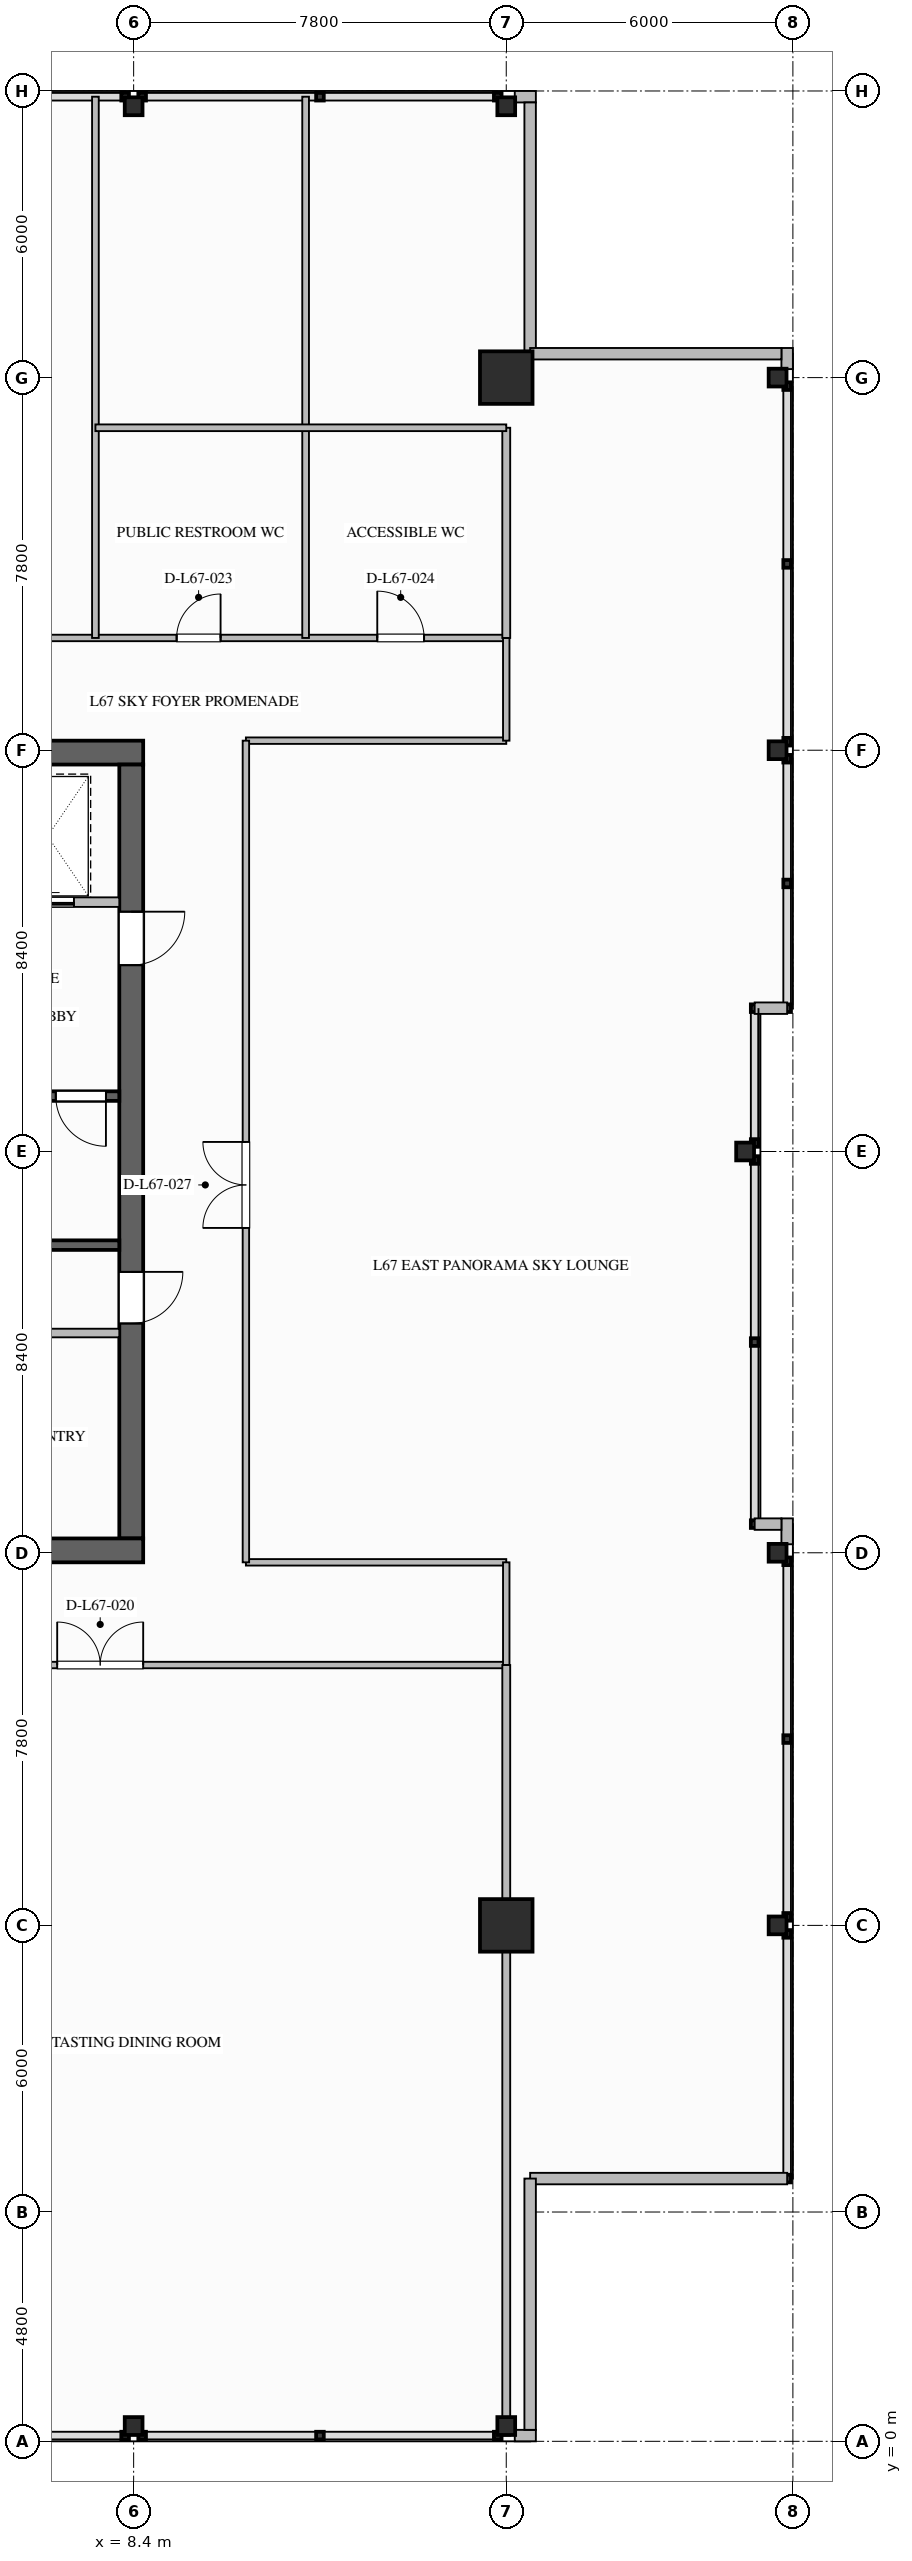
"""IFC4 building model, lengths in metres.
Left out: names, types, materials, properties, quantities, classifications, styles, units other than length and angle.
Written with IfcOpenShell. Run it as: python <this file> out.ifc"""

import sys

from ifc_helpers import new_model, si_unit, direction, frame, frame_2d, origin, origin_2d, place, context, subcontext, project, spatial, rectangle, i_section, extrude, element, fill, save


model = new_model("IFC4")
c1 = context("Model", 3, precision=1e-05, world=origin(), true_north=direction((0.0, 1.0)))
c2 = subcontext(c1, "Body", "Model", "MODEL_VIEW")
j1 = project(units=[si_unit("LENGTHUNIT", "METRE"), si_unit("PLANEANGLEUNIT", "RADIAN")], contexts=[c1])
p1 = place(None, origin())
s1 = spatial("IfcSite", under=j1, at=p1, CompositionType="ELEMENT")
p2 = place(p1, origin())
s2 = spatial("IfcBuilding", under=s1, at=p2, CompositionType="ELEMENT")
p3 = place(p2, frame((0.0, 0.0, 255.5)))
s3 = spatial("IfcBuildingStorey", under=s2, at=p3, CompositionType="ELEMENT", Elevation=255.5)
p4 = place(p3, frame((-8.6, 35.35, 0.0), z_axis=(0.0, 0.0, 1.0), x_axis=(1.0, 0.0, 0.0)))
e1 = element("IfcWall", 1, at=p4, inside=s3, PredefinedType="SHEAR", context=c2, shape_type="SweptSolid", body=[
    extrude(rectangle(XDim=17.2, YDim=0.5, at=frame_2d((8.6, 0.0))), origin(), (0.0, 0.0, 1.0), 4.5),
])
p5 = place(p3, frame((8.35, 35.1, 0.0), z_axis=(0.0, 0.0, 1.0), x_axis=(0.0, -1.0, 0.0)))
e2 = element("IfcWall", 2, at=p5, inside=s3, PredefinedType="SHEAR", context=c2, shape_type="SweptSolid", body=[
    extrude(rectangle(XDim=16.2, YDim=0.5, at=frame_2d((8.1, 0.0))), origin(), (0.0, 0.0, 1.0), 4.5),
])
p6 = place(p5, frame((3.08, 0.0, 0.0)))
e3 = element("IfcOpeningElement", 3, at=p6, cuts=e2, PredefinedType="OPENING", context=c2, shape_type="SweptSolid", body=[
    extrude(rectangle(XDim=1.12, YDim=2.1, at=frame_2d((0.56, 1.05))), frame((0.0, 0.26, 0.0), z_axis=(0.0, -1.0, 0.0), x_axis=(1.0, 0.0, 0.0)), (0.0, 0.0, 1.0), 0.52),
])
p7 = place(p5, frame((10.62, 0.0, 0.0)))
e4 = element("IfcOpeningElement", 4, at=p7, cuts=e2, PredefinedType="OPENING", context=c2, shape_type="SweptSolid", body=[
    extrude(rectangle(XDim=1.08, YDim=2.04, at=frame_2d((0.54, 1.02))), frame((0.0, 0.26, 0.0), z_axis=(0.0, -1.0, 0.0), x_axis=(1.0, 0.0, 0.0)), (0.0, 0.0, 1.0), 0.52),
])
p8 = place(p3, frame((8.6, 18.65, 0.0), z_axis=(0.0, 0.0, 1.0), x_axis=(-1.0, 0.0, 0.0)))
e5 = element("IfcWall", 5, at=p8, inside=s3, PredefinedType="SHEAR", context=c2, shape_type="SweptSolid", body=[
    extrude(rectangle(XDim=17.2, YDim=0.5, at=frame_2d((8.6, 0.0))), origin(), (0.0, 0.0, 1.0), 4.5),
])
for number, where, z_axis, x_axis in (
    (6, (16.2, 10.8, 0.0), (0.0, 0.0, 1.0), (1.0, 0.0, 0.0)),
    (7, (16.2, 43.2, 0.0), (0.0, 0.0, 1.0), (1.0, 0.0, 0.0)),
):
    element("IfcColumn", number, at=place(p3, frame(where, z_axis=z_axis, x_axis=x_axis)), inside=s3, PredefinedType="COLUMN", context=c2, shape_type="SweptSolid", body=[
        extrude(rectangle(XDim=1.1, YDim=1.1, at=origin_2d()), origin(), (0.0, 0.0, 1.0), 4.5),
    ])
for number, where, z_axis, x_axis in (
    (8, (21.88, 10.8, 0.0), (0.0, 0.0, 1.0), (1.0, 0.0, 0.0)),
    (9, (21.88, 18.6, 0.0), (0.0, 0.0, 1.0), (1.0, 0.0, 0.0)),
    (10, (21.2, 27.0, 0.0), (0.0, 0.0, 1.0), (1.0, 0.0, 0.0)),
    (11, (21.88, 35.4, 0.0), (0.0, 0.0, 1.0), (1.0, 0.0, 0.0)),
    (12, (21.88, 43.2, 0.0), (0.0, 0.0, 1.0), (1.0, 0.0, 0.0)),
    (13, (8.4, 0.32, 0.0), (0.0, 0.0, 1.0), (0.0, 1.0, 0.0)),
    (14, (8.4, 48.88, 0.0), (0.0, 0.0, 1.0), (0.0, 1.0, 0.0)),
    (15, (16.2, 0.32, 0.0), (0.0, 0.0, 1.0), (0.0, 1.0, 0.0)),
    (16, (16.2, 48.88, 0.0), (0.0, 0.0, 1.0), (0.0, 1.0, 0.0)),
):
    element("IfcColumn", number, at=place(p3, frame(where, z_axis=z_axis, x_axis=x_axis)), inside=s3, PredefinedType="COLUMN", context=c2, shape_type="SweptSolid", body=[
        extrude(i_section(OverallWidth=0.374, OverallDepth=0.372, WebThickness=0.016, FlangeThickness=0.026, FilletRadius=0.025, at=origin_2d()), origin(), (0.0, 0.0, 1.0), 4.497),
    ])
p9 = place(p3, frame((22.08, 43.82, 0.0), z_axis=(0.0, 0.0, 1.0), x_axis=(0.0, -1.0, 0.0)))
e17 = element("IfcWall", 17, at=p9, inside=s3, PredefinedType="STANDARD", context=c2, shape_type="SweptSolid", body=[
    extrude(rectangle(XDim=0.442, YDim=0.24, at=frame_2d((0.221, 0.0))), origin(), (0.0, 0.0, 1.0), 4.18),
])
p10 = place(p3, frame((22.08, 19.32, 0.0), z_axis=(0.0, 0.0, 1.0), x_axis=(0.0, -1.0, 0.0)))
e18 = element("IfcWall", 18, at=p10, inside=s3, PredefinedType="STANDARD", context=c2, shape_type="SweptSolid", body=[
    extrude(rectangle(XDim=0.542, YDim=0.24, at=frame_2d((0.271, 0.0))), origin(), (0.0, 0.0, 1.0), 4.18),
])
for number, where, z_axis, x_axis in (
    (19, (16.378, 49.08, 0.0), (0.0, 0.0, 1.0), (1.0, 0.0, 0.0)),
    (20, (16.82, 0.12, 0.0), (0.0, 0.0, 1.0), (-1.0, 0.0, 0.0)),
):
    element("IfcWall", number, at=place(p3, frame(where, z_axis=z_axis, x_axis=x_axis)), inside=s3, PredefinedType="STANDARD", context=c2, shape_type="SweptSolid", body=[
        extrude(rectangle(XDim=0.442, YDim=0.24, at=frame_2d((0.221, 0.0))), origin(), (0.0, 0.0, 1.0), 4.18),
    ])
for number, where, z_axis, x_axis in (
    (21, (16.7, 48.96, 0.0), (0.0, 0.0, 1.0), (0.0, -1.0, 0.0)),
    (22, (16.7, 43.7, 0.0), (0.0, 0.0, 1.0), (1.0, 0.0, 0.0)),
):
    element("IfcWall", number, at=place(p3, frame(where, z_axis=z_axis, x_axis=x_axis)), inside=s3, PredefinedType="STANDARD", context=c2, shape_type="SweptSolid", body=[
        extrude(rectangle(XDim=5.26, YDim=0.24, at=frame_2d((2.63, 0.0))), origin(), (0.0, 0.0, 1.0), 4.18),
    ])
p11 = place(p3, frame((22.08, 5.5, 0.0), z_axis=(0.0, 0.0, 1.0), x_axis=(-1.0, 0.0, 0.0)))
e23 = element("IfcWall", 23, at=p11, inside=s3, PredefinedType="STANDARD", context=c2, shape_type="SweptSolid", body=[
    extrude(rectangle(XDim=5.38, YDim=0.24, at=frame_2d((2.69, 0.0))), origin(), (0.0, 0.0, 1.0), 4.18),
])
p12 = place(p3, frame((16.7, 5.5, 0.0), z_axis=(0.0, 0.0, 1.0), x_axis=(0.0, -1.0, 0.0)))
e24 = element("IfcWall", 24, at=p12, inside=s3, PredefinedType="STANDARD", context=c2, shape_type="SweptSolid", body=[
    extrude(rectangle(XDim=5.26, YDim=0.24, at=frame_2d((2.63, 0.0))), origin(), (0.0, 0.0, 1.0), 4.18),
])
p13 = place(p3, frame((22.08, 30.0, 0.0), z_axis=(0.0, 0.0, 1.0), x_axis=(-1.0, 0.0, 0.0)))
e25 = element("IfcWall", 25, at=p13, inside=s3, PredefinedType="STANDARD", context=c2, shape_type="SweptSolid", body=[
    extrude(rectangle(XDim=0.68, YDim=0.24, at=frame_2d((0.34, 0.0))), origin(), (0.0, 0.0, 1.0), 4.18),
])
p14 = place(p3, frame((21.4, 19.2, 0.0), z_axis=(0.0, 0.0, 1.0), x_axis=(1.0, 0.0, 0.0)))
e26 = element("IfcWall", 26, at=p14, inside=s3, PredefinedType="STANDARD", context=c2, shape_type="SweptSolid", body=[
    extrude(rectangle(XDim=0.56, YDim=0.24, at=frame_2d((0.28, 0.0))), origin(), (0.0, 0.0, 1.0), 4.18),
])
p15 = place(p3, frame((0.0, 25.04, 0.0), z_axis=(0.0, 0.0, 1.0), x_axis=(1.0, 0.0, 0.0)))
e27 = element("IfcWall", 27, at=p15, inside=s3, PredefinedType="SOLIDWALL", context=c2, shape_type="SweptSolid", body=[
    extrude(rectangle(XDim=8.1, YDim=0.2, at=frame_2d((4.05, 0.0))), origin(), (0.0, 0.0, 1.0), 4.18),
])
p16 = place(p3, frame((8.1, 28.16, 0.0), z_axis=(0.0, 0.0, 1.0), x_axis=(-1.0, 0.0, 0.0)))
e28 = element("IfcWall", 28, at=p16, inside=s3, PredefinedType="SOLIDWALL", context=c2, shape_type="SweptSolid", body=[
    extrude(rectangle(XDim=8.1, YDim=0.2, at=frame_2d((4.05, 0.0))), origin(), (0.0, 0.0, 1.0), 4.18),
])
p17 = place(p16, frame((0.28, 0.0, 0.0)))
e29 = element("IfcOpeningElement", 29, at=p17, cuts=e28, PredefinedType="OPENING", context=c2, shape_type="SweptSolid", body=[
    extrude(rectangle(XDim=1.05, YDim=2.1, at=frame_2d((0.525, 1.05))), frame((0.0, 0.11, 0.0), z_axis=(0.0, -1.0, 0.0), x_axis=(1.0, 0.0, 0.0)), (0.0, 0.0, 1.0), 0.22),
])
p18 = place(p3, frame((3.1, 32.22, 0.0), z_axis=(0.0, 0.0, 1.0), x_axis=(1.0, 0.0, 0.0)))
e30 = element("IfcWall", 30, at=p18, inside=s3, PredefinedType="SOLIDWALL", context=c2, shape_type="SweptSolid", body=[
    extrude(rectangle(XDim=5.0, YDim=0.2, at=frame_2d((2.5, 0.0))), origin(), (0.0, 0.0, 1.0), 4.18),
])
p19 = place(p18, frame((0.55, 0.0, 0.0)))
e31 = element("IfcOpeningElement", 31, at=p19, cuts=e30, PredefinedType="OPENING", context=c2, shape_type="SweptSolid", body=[
    extrude(rectangle(XDim=1.2, YDim=2.2, at=frame_2d((0.6, 1.1))), frame((0.0, 0.11, 0.0), z_axis=(0.0, -1.0, 0.0), x_axis=(1.0, 0.0, 0.0)), (0.0, 0.0, 1.0), 0.22),
])
p20 = place(p18, frame((2.85, 0.0, 0.0)))
e32 = element("IfcOpeningElement", 32, at=p20, cuts=e30, PredefinedType="OPENING", context=c2, shape_type="SweptSolid", body=[
    extrude(rectangle(XDim=1.2, YDim=2.2, at=frame_2d((0.6, 1.1))), frame((0.0, 0.11, 0.0), z_axis=(0.0, -1.0, 0.0), x_axis=(1.0, 0.0, 0.0)), (0.0, 0.0, 1.0), 0.22),
])
p21 = place(p3, frame((-8.1, 23.2, 0.0), z_axis=(0.0, 0.0, 1.0), x_axis=(1.0, 0.0, 0.0)))
e33 = element("IfcWall", 33, at=p21, inside=s3, PredefinedType="SOLIDWALL", context=c2, shape_type="SweptSolid", body=[
    extrude(rectangle(XDim=16.2, YDim=0.18, at=frame_2d((8.1, 0.0))), origin(), (0.0, 0.0, 1.0), 4.18),
])
p22 = place(p21, frame((2.8, 0.0, 0.0)))
e34 = element("IfcOpeningElement", 34, at=p22, cuts=e33, PredefinedType="OPENING", context=c2, shape_type="SweptSolid", body=[
    extrude(rectangle(XDim=1.0, YDim=2.1, at=frame_2d((0.5, 1.05))), frame((0.0, 0.1, 0.0), z_axis=(0.0, -1.0, 0.0), x_axis=(1.0, 0.0, 0.0)), (0.0, 0.0, 1.0), 0.2),
])
p23 = place(p21, frame((11.5, 0.0, 0.0)))
e35 = element("IfcOpeningElement", 35, at=p23, cuts=e33, PredefinedType="OPENING", context=c2, shape_type="SweptSolid", body=[
    extrude(rectangle(XDim=1.0, YDim=2.1, at=frame_2d((0.5, 1.05))), frame((0.0, 0.1, 0.0), z_axis=(0.0, -1.0, 0.0), x_axis=(1.0, 0.0, 0.0)), (0.0, 0.0, 1.0), 0.2),
])
p24 = place(p3, frame((-16.2, 16.25, 0.0), z_axis=(0.0, 0.0, 1.0), x_axis=(1.0, 0.0, 0.0)))
e36 = element("IfcWall", 36, at=p24, inside=s3, PredefinedType="PARTITIONING", context=c2, shape_type="SweptSolid", body=[
    extrude(rectangle(XDim=32.4, YDim=0.135, at=frame_2d((16.2, 0.0))), origin(), (0.0, 0.0, 1.0), 4.18),
])
p25 = place(p24, frame((5.0, 0.0, 0.0)))
e37 = element("IfcOpeningElement", 37, at=p25, cuts=e36, PredefinedType="OPENING", context=c2, shape_type="SweptSolid", body=[
    extrude(rectangle(XDim=1.8, YDim=2.35, at=frame_2d((0.9, 1.175))), frame((0.0, 0.077, 0.0), z_axis=(0.0, -1.0, 0.0), x_axis=(1.0, 0.0, 0.0)), (0.0, 0.0, 1.0), 0.155),
])
p26 = place(p24, frame((23.0, 0.0, 0.0)))
e38 = element("IfcOpeningElement", 38, at=p26, cuts=e36, PredefinedType="OPENING", context=c2, shape_type="SweptSolid", body=[
    extrude(rectangle(XDim=1.8, YDim=2.35, at=frame_2d((0.9, 1.175))), frame((0.0, 0.077, 0.0), z_axis=(0.0, -1.0, 0.0), x_axis=(1.0, 0.0, 0.0)), (0.0, 0.0, 1.0), 0.155),
])
p27 = place(p3, frame((-16.2, 37.75, 0.0), z_axis=(0.0, 0.0, 1.0), x_axis=(1.0, 0.0, 0.0)))
e39 = element("IfcWall", 39, at=p27, inside=s3, PredefinedType="PARTITIONING", context=c2, shape_type="SweptSolid", body=[
    extrude(rectangle(XDim=32.4, YDim=0.135, at=frame_2d((16.2, 0.0))), origin(), (0.0, 0.0, 1.0), 4.18),
])
p28 = place(p27, frame((4.0, 0.0, 0.0)))
e40 = element("IfcOpeningElement", 40, at=p28, cuts=e39, PredefinedType="OPENING", context=c2, shape_type="SweptSolid", body=[
    extrude(rectangle(XDim=1.26, YDim=2.2, at=frame_2d((0.63, 1.1))), frame((0.0, 0.077, 0.0), z_axis=(0.0, -1.0, 0.0), x_axis=(1.0, 0.0, 0.0)), (0.0, 0.0, 1.0), 0.155),
])
p29 = place(p27, frame((16.9, 0.0, 0.0)))
e41 = element("IfcOpeningElement", 41, at=p29, cuts=e39, PredefinedType="OPENING", context=c2, shape_type="SweptSolid", body=[
    extrude(rectangle(XDim=1.26, YDim=2.2, at=frame_2d((0.63, 1.1))), frame((0.0, 0.077, 0.0), z_axis=(0.0, -1.0, 0.0), x_axis=(1.0, 0.0, 0.0)), (0.0, 0.0, 1.0), 0.155),
])
p30 = place(p27, frame((25.5, 0.0, 0.0)))
e42 = element("IfcOpeningElement", 42, at=p30, cuts=e39, PredefinedType="OPENING", context=c2, shape_type="SweptSolid", body=[
    extrude(rectangle(XDim=0.92, YDim=2.1, at=frame_2d((0.46, 1.05))), frame((0.0, 0.077, 0.0), z_axis=(0.0, -1.0, 0.0), x_axis=(1.0, 0.0, 0.0)), (0.0, 0.0, 1.0), 0.155),
])
p31 = place(p27, frame((29.7, 0.0, 0.0)))
e43 = element("IfcOpeningElement", 43, at=p31, cuts=e39, PredefinedType="OPENING", context=c2, shape_type="SweptSolid", body=[
    extrude(rectangle(XDim=0.98, YDim=2.1, at=frame_2d((0.49, 1.05))), frame((0.0, 0.077, 0.0), z_axis=(0.0, -1.0, 0.0), x_axis=(1.0, 0.0, 0.0)), (0.0, 0.0, 1.0), 0.155),
])
for number, where, z_axis, x_axis in (
    (44, (10.75, 18.4, 0.0), (0.0, 0.0, 1.0), (1.0, 0.0, 0.0)),
    (45, (10.75, 35.6, 0.0), (0.0, 0.0, 1.0), (1.0, 0.0, 0.0)),
):
    element("IfcWall", number, at=place(p3, frame(where, z_axis=z_axis, x_axis=x_axis)), inside=s3, PredefinedType="PARTITIONING", context=c2, shape_type="SweptSolid", body=[
        extrude(rectangle(XDim=5.45, YDim=0.135, at=frame_2d((2.725, 0.0))), origin(), (0.0, 0.0, 1.0), 3.557),
    ])
p32 = place(p3, frame((10.75, 18.4, 0.0), z_axis=(0.0, 0.0, 1.0), x_axis=(0.0, 1.0, 0.0)))
e46 = element("IfcWall", 46, at=p32, inside=s3, PredefinedType="PARTITIONING", context=c2, shape_type="SweptSolid", body=[
    extrude(rectangle(XDim=17.2, YDim=0.135, at=frame_2d((8.6, 0.0))), origin(), (0.0, 0.0, 1.0), 4.18),
])
p33 = place(p32, frame((7.0, 0.0, 0.0)))
e47 = element("IfcOpeningElement", 47, at=p33, cuts=e46, PredefinedType="OPENING", context=c2, shape_type="SweptSolid", body=[
    extrude(rectangle(XDim=1.8, YDim=2.35, at=frame_2d((0.9, 1.175))), frame((0.0, 0.077, 0.0), z_axis=(0.0, -1.0, 0.0), x_axis=(1.0, 0.0, 0.0)), (0.0, 0.0, 1.0), 0.155),
])
for number, where, z_axis, x_axis in (
    (48, (16.2, 16.25, 0.0), (0.0, 0.0, 1.0), (0.0, 1.0, 0.0)),
    (49, (16.2, 35.6, 0.0), (0.0, 0.0, 1.0), (0.0, 1.0, 0.0)),
):
    element("IfcWall", number, at=place(p3, frame(where, z_axis=z_axis, x_axis=x_axis)), inside=s3, PredefinedType="PARTITIONING", context=c2, shape_type="SweptSolid", body=[
        extrude(rectangle(XDim=2.15, YDim=0.135, at=frame_2d((1.075, 0.0))), origin(), (0.0, 0.0, 1.0), 3.554),
    ])
p34 = place(p3, frame((16.2, 0.12, 0.0), z_axis=(0.0, 0.0, 1.0), x_axis=(0.0, 1.0, 0.0)))
e50 = element("IfcWall", 50, at=p34, inside=s3, PredefinedType="PARTITIONING", context=c2, shape_type="SweptSolid", body=[
    extrude(rectangle(XDim=16.13, YDim=0.165, at=frame_2d((8.065, 0.0))), origin(), (0.0, 0.0, 1.0), 3.554),
])
p35 = place(p3, frame((16.2, 37.75, 0.0), z_axis=(0.0, 0.0, 1.0), x_axis=(0.0, 1.0, 0.0)))
e51 = element("IfcWall", 51, at=p35, inside=s3, PredefinedType="PARTITIONING", context=c2, shape_type="SweptSolid", body=[
    extrude(rectangle(XDim=4.4, YDim=0.165, at=frame_2d((2.2, 0.0))), origin(), (0.0, 0.0, 1.0), 3.554),
])
for number, where, z_axis, x_axis in (
    (52, (7.6, 37.75, 0.0), (0.0, 0.0, 1.0), (0.0, 1.0, 0.0)),
    (53, (12.0, 37.75, 0.0), (0.0, 0.0, 1.0), (0.0, 1.0, 0.0)),
):
    element("IfcWall", number, at=place(p3, frame(where, z_axis=z_axis, x_axis=x_axis)), inside=s3, PredefinedType="PLUMBINGWALL", context=c2, shape_type="SweptSolid", body=[
        extrude(rectangle(XDim=11.33, YDim=0.14, at=frame_2d((5.665, 0.0))), origin(), (0.0, 0.0, 1.0), 4.18),
    ])
p36 = place(p3, frame((7.6, 42.15, 0.0), z_axis=(0.0, 0.0, 1.0), x_axis=(1.0, 0.0, 0.0)))
e54 = element("IfcWall", 54, at=p36, inside=s3, PredefinedType="PLUMBINGWALL", context=c2, shape_type="SweptSolid", body=[
    extrude(rectangle(XDim=8.6, YDim=0.14, at=frame_2d((4.3, 0.0))), origin(), (0.0, 0.0, 1.0), 4.18),
])
p37 = place(p17, origin())
e55 = element("IfcDoor", 55, at=p37, inside=s3, OperationType="SINGLE_SWING_LEFT", PredefinedType="DOOR", context=c2, shape_type="SweptSolid", body=[
    extrude(rectangle(XDim=1.05, YDim=2.1, at=frame_2d((0.525, 1.05))), frame((0.0, 0.025, 0.0), z_axis=(0.0, -1.0, 0.0), x_axis=(1.0, 0.0, 0.0)), (0.0, 0.0, 1.0), 0.05),
])
fill(e29, e55)
p38 = place(p20, origin())
e56 = element("IfcDoor", 56, at=p38, inside=s3, OperationType="SLIDING_TO_LEFT", PredefinedType="DOOR", context=c2, shape_type="SweptSolid", body=[
    extrude(rectangle(XDim=1.2, YDim=2.2, at=frame_2d((0.6, 1.1))), frame((0.0, 0.025, 0.0), z_axis=(0.0, -1.0, 0.0), x_axis=(1.0, 0.0, 0.0)), (0.0, 0.0, 1.0), 0.05),
])
fill(e32, e56)
p39 = place(p6, origin())
e57 = element("IfcDoor", 57, at=p39, inside=s3, OperationType="SINGLE_SWING_LEFT", PredefinedType="DOOR", context=c2, shape_type="SweptSolid", body=[
    extrude(rectangle(XDim=1.12, YDim=2.1, at=frame_2d((0.56, 1.05))), frame((0.0, 0.025, 0.0), z_axis=(0.0, -1.0, 0.0), x_axis=(1.0, 0.0, 0.0)), (0.0, 0.0, 1.0), 0.05),
])
fill(e3, e57)
p40 = place(p7, origin())
e58 = element("IfcDoor", 58, at=p40, inside=s3, OperationType="SINGLE_SWING_LEFT", PredefinedType="DOOR", context=c2, shape_type="SweptSolid", body=[
    extrude(rectangle(XDim=1.08, YDim=2.04, at=frame_2d((0.54, 1.02))), frame((0.0, 0.025, 0.0), z_axis=(0.0, -1.0, 0.0), x_axis=(1.0, 0.0, 0.0)), (0.0, 0.0, 1.0), 0.05),
])
fill(e4, e58)
p41 = place(p26, origin())
e59 = element("IfcDoor", 59, at=p41, inside=s3, OperationType="DOUBLE_DOOR_SINGLE_SWING", PredefinedType="DOOR", context=c2, shape_type="SweptSolid", body=[
    extrude(rectangle(XDim=1.8, YDim=2.35, at=frame_2d((0.9, 1.175))), frame((0.0, 0.025, 0.0), z_axis=(0.0, -1.0, 0.0), x_axis=(1.0, 0.0, 0.0)), (0.0, 0.0, 1.0), 0.05),
])
fill(e38, e59)
p42 = place(p30, origin())
e60 = element("IfcDoor", 60, at=p42, inside=s3, OperationType="SINGLE_SWING_RIGHT", PredefinedType="DOOR", context=c2, shape_type="SweptSolid", body=[
    extrude(rectangle(XDim=0.92, YDim=2.1, at=frame_2d((0.46, 1.05))), frame((0.0, 0.025, 0.0), z_axis=(0.0, -1.0, 0.0), x_axis=(1.0, 0.0, 0.0)), (0.0, 0.0, 1.0), 0.05),
])
fill(e42, e60)
p43 = place(p31, origin())
e61 = element("IfcDoor", 61, at=p43, inside=s3, OperationType="SINGLE_SWING_LEFT", PredefinedType="DOOR", context=c2, shape_type="SweptSolid", body=[
    extrude(rectangle(XDim=0.98, YDim=2.1, at=frame_2d((0.49, 1.05))), frame((0.0, 0.025, 0.0), z_axis=(0.0, -1.0, 0.0), x_axis=(1.0, 0.0, 0.0)), (0.0, 0.0, 1.0), 0.05),
])
fill(e43, e61)
p44 = place(p33, origin())
e62 = element("IfcDoor", 62, at=p44, inside=s3, OperationType="DOUBLE_DOOR_SINGLE_SWING", PredefinedType="DOOR", context=c2, shape_type="SweptSolid", body=[
    extrude(rectangle(XDim=1.8, YDim=2.35, at=frame_2d((0.9, 1.175))), frame((0.0, 0.025, 0.0), z_axis=(0.0, -1.0, 0.0), x_axis=(1.0, 0.0, 0.0)), (0.0, 0.0, 1.0), 0.05),
])
fill(e47, e62)
save(model, sys.argv[1])
